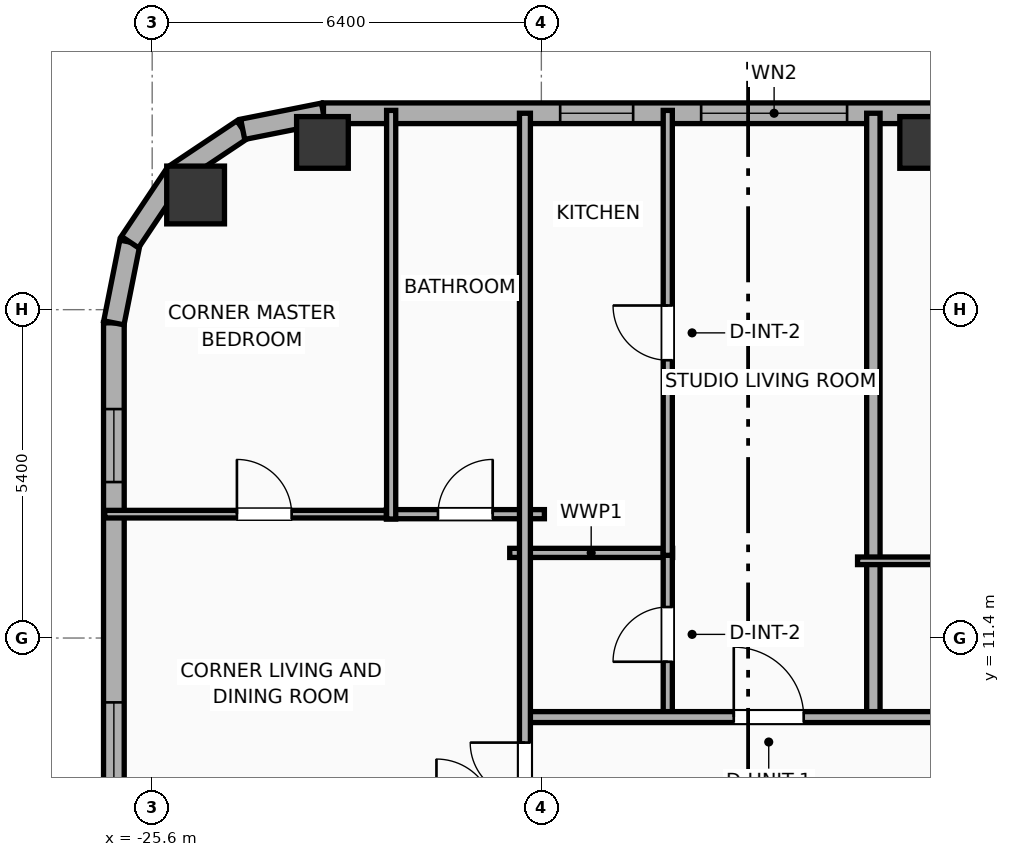
"""IFC4 building model, lengths in metres.
Left out: names, types, materials, properties, quantities, classifications, styles, units other than length and angle.
Written with IfcOpenShell. Run it as: python <this file> out.ifc"""

import sys

from ifc_helpers import new_model, si_unit, direction, frame, frame_2d, origin, origin_2d, place, context, subcontext, project, spatial, rectangle, hollow_rectangle, hollow_circle, extrude, element, fill, save


model = new_model("IFC4")
c1 = context("Model", 3, precision=1e-05, world=origin(), true_north=direction((0.0, 1.0)))
c2 = subcontext(c1, "Body", "Model", "MODEL_VIEW")
j1 = project(units=[si_unit("LENGTHUNIT", "METRE"), si_unit("PLANEANGLEUNIT", "RADIAN")], contexts=[c1])
p1 = place(None, origin())
s1 = spatial("IfcSite", under=j1, at=p1, CompositionType="ELEMENT")
p2 = place(p1, origin())
s2 = spatial("IfcBuilding", under=s1, at=p2, CompositionType="ELEMENT")
p3 = place(p2, frame((0.0, 0.0, 200.2)))
s3 = spatial("IfcBuildingStorey", under=s2, at=p3, CompositionType="ELEMENT", Elevation=200.2)
for number, where, z_axis, x_axis in (
    (1, (-12.88, 19.55, 0.0), (0.0, 0.0, 1.0), (1.0, 0.0, 0.0)),
    (2, (-22.8, 19.55, 0.0), (0.0, 0.0, 1.0), (1.0, 0.0, 0.0)),
):
    element("IfcColumn", number, at=place(p3, frame(where, z_axis=z_axis, x_axis=x_axis)), inside=s3, PredefinedType="COLUMN", context=c2, shape_type="SweptSolid", body=[
        extrude(hollow_rectangle(XDim=0.85, YDim=0.85, WallThickness=0.028, at=origin_2d()), origin(), (0.0, 0.0, 1.0), 3.9),
    ])
p4 = place(p3, frame((-24.886, 18.686, 0.0), z_axis=(0.0, 0.0, 1.0), x_axis=(1.0, 0.0, 0.0)))
e3 = element("IfcColumn", 3, at=p4, inside=s3, PredefinedType="COLUMN", context=c2, shape_type="SweptSolid", body=[
    extrude(hollow_circle(Radius=0.475, WallThickness=0.032, at=origin_2d()), origin(), (0.0, 0.0, 1.0), 3.9),
])
p5 = place(p3, frame((-26.23, -15.383, 0.0), z_axis=(0.0, 0.0, 1.0), x_axis=(0.0, 1.0, 0.0)))
e4 = element("IfcWall", 4, at=p5, inside=s3, PredefinedType="ELEMENTEDWALL", context=c2, shape_type="SweptSolid", body=[
    extrude(rectangle(XDim=31.967, YDim=0.34, at=frame_2d((15.983, 0.0))), origin(), (0.0, 0.0, 1.0), 2.54),
])
p6 = place(p5, frame((6.242, 0.0, 0.75)))
e5 = element("IfcOpeningElement", 5, at=p6, cuts=e4, PredefinedType="OPENING", context=c2, shape_type="SweptSolid", body=[
    extrude(rectangle(XDim=1.8, YDim=1.63, at=frame_2d((0.9, 0.815))), frame((0.0, 0.18, 0.0), z_axis=(0.0, -1.0, 0.0), x_axis=(1.0, 0.0, 0.0)), (0.0, 0.0, 1.0), 0.36),
])
p7 = place(p5, frame((23.925, 0.0, 0.75)))
e6 = element("IfcOpeningElement", 6, at=p7, cuts=e4, PredefinedType="OPENING", context=c2, shape_type="SweptSolid", body=[
    extrude(rectangle(XDim=1.8, YDim=1.63, at=frame_2d((0.9, 0.815))), frame((0.0, 0.18, 0.0), z_axis=(0.0, -1.0, 0.0), x_axis=(1.0, 0.0, 0.0)), (0.0, 0.0, 1.0), 0.36),
])
p8 = place(p5, frame((13.253, 0.0, 0.75)))
e7 = element("IfcOpeningElement", 7, at=p8, cuts=e4, PredefinedType="OPENING", context=c2, shape_type="SweptSolid", body=[
    extrude(rectangle(XDim=1.2, YDim=1.63, at=frame_2d((0.6, 0.815))), frame((0.0, 0.18, 0.0), z_axis=(0.0, -1.0, 0.0), x_axis=(1.0, 0.0, 0.0)), (0.0, 0.0, 1.0), 0.36),
])
p9 = place(p5, frame((29.348, 0.0, 0.75)))
e8 = element("IfcOpeningElement", 8, at=p9, cuts=e4, PredefinedType="OPENING", context=c2, shape_type="SweptSolid", body=[
    extrude(rectangle(XDim=1.2, YDim=1.63, at=frame_2d((0.6, 0.815))), frame((0.0, 0.18, 0.0), z_axis=(0.0, -1.0, 0.0), x_axis=(1.0, 0.0, 0.0)), (0.0, 0.0, 1.0), 0.36),
])
p10 = place(p3, frame((-26.23, 16.583, 0.0), z_axis=(0.0, 0.0, 1.0), x_axis=(0.195075878998, 0.980788153188, 0.0)))
e9 = element("IfcWall", 9, at=p10, inside=s3, PredefinedType="ELEMENTEDWALL", context=c2, shape_type="SweptSolid", body=[
    extrude(rectangle(XDim=1.354, YDim=0.34, at=frame_2d((0.677, 0.0))), origin(), (0.0, 0.0, 1.0), 3.65),
])
p11 = place(p3, frame((-25.966, 17.911, 0.0), z_axis=(0.0, 0.0, 1.0), x_axis=(0.555669034571, 0.831403586725, 0.0)))
e10 = element("IfcWall", 10, at=p11, inside=s3, PredefinedType="ELEMENTEDWALL", context=c2, shape_type="SweptSolid", body=[
    extrude(rectangle(XDim=1.337, YDim=0.34, at=frame_2d((0.668, 0.0))), origin(), (0.0, 0.0, 1.0), 3.65),
])
p12 = place(p3, frame((-25.223, 19.023, 0.0), z_axis=(0.0, 0.0, 1.0), x_axis=(0.831403586725, 0.555669034571, 0.0)))
e11 = element("IfcWall", 11, at=p12, inside=s3, PredefinedType="ELEMENTEDWALL", context=c2, shape_type="SweptSolid", body=[
    extrude(rectangle(XDim=1.337, YDim=0.34, at=frame_2d((0.668, 0.0))), origin(), (0.0, 0.0, 1.0), 2.54),
])
p13 = place(p3, frame((-24.111, 19.766, 0.0), z_axis=(0.0, 0.0, 1.0), x_axis=(0.980788153188, 0.195075878998, 0.0)))
e12 = element("IfcWall", 12, at=p13, inside=s3, PredefinedType="ELEMENTEDWALL", context=c2, shape_type="SweptSolid", body=[
    extrude(rectangle(XDim=1.354, YDim=0.34, at=frame_2d((0.677, 0.0))), origin(), (0.0, 0.0, 1.0), 2.54),
])
p14 = place(p3, frame((-22.783, 20.03, 0.0), z_axis=(0.0, 0.0, 1.0), x_axis=(1.0, 0.0, 0.0)))
e13 = element("IfcWall", 13, at=p14, inside=s3, PredefinedType="ELEMENTEDWALL", context=c2, shape_type="SweptSolid", body=[
    extrude(rectangle(XDim=49.566, YDim=0.34, at=frame_2d((24.783, 0.0))), origin(), (0.0, 0.0, 1.0), 2.54),
])
p15 = place(p14, frame((6.211, 0.0, 0.75)))
e14 = element("IfcOpeningElement", 14, at=p15, cuts=e13, PredefinedType="OPENING", context=c2, shape_type="SweptSolid", body=[
    extrude(rectangle(XDim=2.4, YDim=1.63, at=frame_2d((1.2, 0.815))), frame((0.0, 0.18, 0.0), z_axis=(0.0, -1.0, 0.0), x_axis=(1.0, 0.0, 0.0)), (0.0, 0.0, 1.0), 0.36),
])
p16 = place(p14, frame((23.583, 0.0, 0.75)))
e15 = element("IfcOpeningElement", 15, at=p16, cuts=e13, PredefinedType="OPENING", context=c2, shape_type="SweptSolid", body=[
    extrude(rectangle(XDim=2.4, YDim=1.63, at=frame_2d((1.2, 0.815))), frame((0.0, 0.18, 0.0), z_axis=(0.0, -1.0, 0.0), x_axis=(1.0, 0.0, 0.0)), (0.0, 0.0, 1.0), 0.36),
])
p17 = place(p14, frame((3.893, 0.0, 0.75)))
e16 = element("IfcOpeningElement", 16, at=p17, cuts=e13, PredefinedType="OPENING", context=c2, shape_type="SweptSolid", body=[
    extrude(rectangle(XDim=1.2, YDim=1.63, at=frame_2d((0.6, 0.815))), frame((0.0, 0.18, 0.0), z_axis=(0.0, -1.0, 0.0), x_axis=(1.0, 0.0, 0.0)), (0.0, 0.0, 1.0), 0.36),
])
p18 = place(p14, frame((11.273, 0.0, 0.75)))
e17 = element("IfcOpeningElement", 17, at=p18, cuts=e13, PredefinedType="OPENING", context=c2, shape_type="SweptSolid", body=[
    extrude(rectangle(XDim=1.2, YDim=1.63, at=frame_2d((0.6, 0.815))), frame((0.0, 0.18, 0.0), z_axis=(0.0, -1.0, 0.0), x_axis=(1.0, 0.0, 0.0)), (0.0, 0.0, 1.0), 0.36),
])
p19 = place(p14, frame((31.889, 0.0, 0.75)))
e18 = element("IfcOpeningElement", 18, at=p19, cuts=e13, PredefinedType="OPENING", context=c2, shape_type="SweptSolid", body=[
    extrude(rectangle(XDim=1.2, YDim=1.63, at=frame_2d((0.6, 0.815))), frame((0.0, 0.18, 0.0), z_axis=(0.0, -1.0, 0.0), x_axis=(1.0, 0.0, 0.0)), (0.0, 0.0, 1.0), 0.36),
])
p20 = place(p14, frame((34.719, 0.0, 0.75)))
e19 = element("IfcOpeningElement", 19, at=p20, cuts=e13, PredefinedType="OPENING", context=c2, shape_type="SweptSolid", body=[
    extrude(rectangle(XDim=1.2, YDim=1.63, at=frame_2d((0.6, 0.815))), frame((0.0, 0.18, 0.0), z_axis=(0.0, -1.0, 0.0), x_axis=(1.0, 0.0, 0.0)), (0.0, 0.0, 1.0), 0.36),
])
p21 = place(p14, frame((37.823, 0.0, 0.75)))
e20 = element("IfcOpeningElement", 20, at=p21, cuts=e13, PredefinedType="OPENING", context=c2, shape_type="SweptSolid", body=[
    extrude(rectangle(XDim=1.2, YDim=1.63, at=frame_2d((0.6, 0.815))), frame((0.0, 0.18, 0.0), z_axis=(0.0, -1.0, 0.0), x_axis=(1.0, 0.0, 0.0)), (0.0, 0.0, 1.0), 0.36),
])
p22 = place(p14, frame((16.113, 0.0, 0.75)))
e21 = element("IfcOpeningElement", 21, at=p22, cuts=e13, PredefinedType="OPENING", context=c2, shape_type="SweptSolid", body=[
    extrude(rectangle(XDim=1.2, YDim=1.63, at=frame_2d((0.6, 0.815))), frame((0.0, 0.18, 0.0), z_axis=(0.0, -1.0, 0.0), x_axis=(1.0, 0.0, 0.0)), (0.0, 0.0, 1.0), 0.36),
])
p23 = place(p14, frame((20.513, 0.0, 0.75)))
e22 = element("IfcOpeningElement", 22, at=p23, cuts=e13, PredefinedType="OPENING", context=c2, shape_type="SweptSolid", body=[
    extrude(rectangle(XDim=1.2, YDim=1.63, at=frame_2d((0.6, 0.815))), frame((0.0, 0.18, 0.0), z_axis=(0.0, -1.0, 0.0), x_axis=(1.0, 0.0, 0.0)), (0.0, 0.0, 1.0), 0.36),
])
p24 = place(p14, frame((27.893, 0.0, 0.75)))
e23 = element("IfcOpeningElement", 23, at=p24, cuts=e13, PredefinedType="OPENING", context=c2, shape_type="SweptSolid", body=[
    extrude(rectangle(XDim=1.2, YDim=1.63, at=frame_2d((0.6, 0.815))), frame((0.0, 0.18, 0.0), z_axis=(0.0, -1.0, 0.0), x_axis=(1.0, 0.0, 0.0)), (0.0, 0.0, 1.0), 0.36),
])
p25 = place(p14, frame((45.393, 0.0, 0.75)))
e24 = element("IfcOpeningElement", 24, at=p25, cuts=e13, PredefinedType="OPENING", context=c2, shape_type="SweptSolid", body=[
    extrude(rectangle(XDim=1.2, YDim=1.63, at=frame_2d((0.6, 0.815))), frame((0.0, 0.18, 0.0), z_axis=(0.0, -1.0, 0.0), x_axis=(1.0, 0.0, 0.0)), (0.0, 0.0, 1.0), 0.36),
])
p26 = place(p14, frame((47.28, 0.0, 0.75)))
e25 = element("IfcOpeningElement", 25, at=p26, cuts=e13, PredefinedType="OPENING", context=c2, shape_type="SweptSolid", body=[
    extrude(rectangle(XDim=1.2, YDim=1.63, at=frame_2d((0.6, 0.815))), frame((0.0, 0.18, 0.0), z_axis=(0.0, -1.0, 0.0), x_axis=(1.0, 0.0, 0.0)), (0.0, 0.0, 1.0), 0.36),
])
p27 = place(p3, frame((-19.72, 12.8, 0.0), z_axis=(0.0, 0.0, 1.0), x_axis=(1.0, 0.0, 0.0)))
e26 = element("IfcWall", 26, at=p27, inside=s3, PredefinedType="PLUMBINGWALL", context=c2, shape_type="SweptSolid", body=[
    extrude(rectangle(XDim=2.679, YDim=0.15, at=frame_2d((1.339, 0.0))), origin(), (0.0, 0.0, 1.0), 3.65),
])
p28 = place(p3, frame((-17.121, 10.08, 0.0), z_axis=(0.0, 0.0, 1.0), x_axis=(0.0, 1.0, 0.0)))
e27 = element("IfcWall", 27, at=p28, inside=s3, PredefinedType="PLUMBINGWALL", context=c2, shape_type="SweptSolid", body=[
    extrude(rectangle(XDim=2.76, YDim=0.15, at=frame_2d((1.38, 0.0))), origin(), (0.0, 0.0, 1.0), 3.65),
])
p29 = place(p28, frame((0.93, 0.0, 0.0)))
e28 = element("IfcOpeningElement", 28, at=p29, cuts=e27, PredefinedType="OPENING", context=c2, shape_type="SweptSolid", body=[
    extrude(rectangle(XDim=0.9, YDim=2.05, at=frame_2d((0.45, 1.025))), frame((0.0, 0.085, 0.0), z_axis=(0.0, -1.0, 0.0), x_axis=(1.0, 0.0, 0.0)), (0.0, 0.0, 1.0), 0.17),
])
p30 = place(p3, frame((-17.121, 12.76, 0.0), z_axis=(0.0, 0.0, 1.0), x_axis=(0.0, 1.0, 0.0)))
e29 = element("IfcWall", 29, at=p30, inside=s3, PredefinedType="PLUMBINGWALL", context=c2, shape_type="SweptSolid", body=[
    extrude(rectangle(XDim=7.317, YDim=0.15, at=frame_2d((3.658, 0.0))), origin(), (0.0, 0.0, 1.0), 3.65),
])
p31 = place(p30, frame((3.208, 0.0, 0.0)))
e30 = element("IfcOpeningElement", 30, at=p31, cuts=e29, PredefinedType="OPENING", context=c2, shape_type="SweptSolid", body=[
    extrude(rectangle(XDim=0.9, YDim=2.05, at=frame_2d((0.45, 1.025))), frame((0.0, 0.085, 0.0), z_axis=(0.0, -1.0, 0.0), x_axis=(1.0, 0.0, 0.0)), (0.0, 0.0, 1.0), 0.17),
])
p32 = place(p3, frame((-13.74, 10.02, 0.0), z_axis=(0.0, 0.0, 1.0), x_axis=(0.0, 1.0, 0.0)))
e31 = element("IfcWall", 31, at=p32, inside=s3, PredefinedType="PARTITIONING", context=c2, shape_type="SweptSolid", body=[
    extrude(rectangle(XDim=10.01, YDim=0.22, at=frame_2d((5.005, 0.0))), origin(), (0.0, 0.0, 1.0), 3.65),
])
p33 = place(p3, frame((-14.0, 12.67, 0.0), z_axis=(0.0, 0.0, 1.0), x_axis=(1.0, 0.0, 0.0)))
e32 = element("IfcWall", 32, at=p33, inside=s3, PredefinedType="PARTITIONING", context=c2, shape_type="SweptSolid", body=[
    extrude(rectangle(XDim=2.63, YDim=0.125, at=frame_2d((1.315, 0.0))), origin(), (0.0, 0.0, 1.0), 3.65),
])
p34 = place(p3, frame((-19.5, 10.1, 0.0), z_axis=(0.0, 0.0, 1.0), x_axis=(1.0, 0.0, 0.0)))
e33 = element("IfcWall", 33, at=p34, inside=s3, PredefinedType="PARTITIONING", context=c2, shape_type="SweptSolid", body=[
    extrude(rectangle(XDim=11.42, YDim=0.18, at=frame_2d((5.71, 0.0))), origin(), (0.0, 0.0, 1.0), 3.65),
])
p35 = place(p34, frame((3.464, 0.0, 0.0)))
e34 = element("IfcOpeningElement", 34, at=p35, cuts=e33, PredefinedType="OPENING", context=c2, shape_type="SweptSolid", body=[
    extrude(rectangle(XDim=1.15, YDim=2.05, at=frame_2d((0.575, 1.025))), frame((0.0, 0.1, 0.0), z_axis=(0.0, -1.0, 0.0), x_axis=(1.0, 0.0, 0.0)), (0.0, 0.0, 1.0), 0.2),
])
p36 = place(p34, frame((8.323, 0.0, 0.0)))
e35 = element("IfcOpeningElement", 35, at=p36, cuts=e33, PredefinedType="OPENING", context=c2, shape_type="SweptSolid", body=[
    extrude(rectangle(XDim=0.9, YDim=2.05, at=frame_2d((0.45, 1.025))), frame((0.0, 0.1, 0.0), z_axis=(0.0, -1.0, 0.0), x_axis=(1.0, 0.0, 0.0)), (0.0, 0.0, 1.0), 0.2),
])
p37 = place(p3, frame((-26.38, 13.437, 0.0), z_axis=(0.0, 0.0, 1.0), x_axis=(1.0, 0.0, 0.0)))
e36 = element("IfcWall", 36, at=p37, inside=s3, PredefinedType="PARTITIONING", context=c2, shape_type="SweptSolid", body=[
    extrude(rectangle(XDim=4.77, YDim=0.125, at=frame_2d((2.385, 0.0))), origin(), (0.0, 0.0, 1.0), 3.65),
])
p38 = place(p37, frame((2.174, 0.0, 0.0)))
e37 = element("IfcOpeningElement", 37, at=p38, cuts=e36, PredefinedType="OPENING", context=c2, shape_type="SweptSolid", body=[
    extrude(rectangle(XDim=0.9, YDim=2.05, at=frame_2d((0.45, 1.025))), frame((0.0, 0.073, 0.0), z_axis=(0.0, -1.0, 0.0), x_axis=(1.0, 0.0, 0.0)), (0.0, 0.0, 1.0), 0.145),
])
p39 = place(p3, frame((-21.75, 13.437, 0.0), z_axis=(0.0, 0.0, 1.0), x_axis=(1.0, 0.0, 0.0)))
e38 = element("IfcWall", 38, at=p39, inside=s3, PredefinedType="PLUMBINGWALL", context=c2, shape_type="SweptSolid", body=[
    extrude(rectangle(XDim=2.6, YDim=0.15, at=frame_2d((1.3, 0.0))), origin(), (0.0, 0.0, 1.0), 3.65),
])
p40 = place(p39, frame((0.85, 0.0, 0.0)))
e39 = element("IfcOpeningElement", 39, at=p40, cuts=e38, PredefinedType="OPENING", context=c2, shape_type="SweptSolid", body=[
    extrude(rectangle(XDim=0.9, YDim=2.05, at=frame_2d((0.45, 1.025))), frame((0.0, 0.085, 0.0), z_axis=(0.0, -1.0, 0.0), x_axis=(1.0, 0.0, 0.0)), (0.0, 0.0, 1.0), 0.17),
])
p41 = place(p3, frame((-21.67, 13.357, 0.0), z_axis=(0.0, 0.0, 1.0), x_axis=(0.0, 1.0, 0.0)))
e40 = element("IfcWall", 40, at=p41, inside=s3, PredefinedType="PLUMBINGWALL", context=c2, shape_type="SweptSolid", body=[
    extrude(rectangle(XDim=6.72, YDim=0.15, at=frame_2d((3.36, 0.0))), origin(), (0.0, 0.0, 1.0), 2.54),
])
p42 = place(p3, frame((-19.47, 1.8, 0.0), z_axis=(0.0, 0.0, 1.0), x_axis=(0.0, 1.0, 0.0)))
e41 = element("IfcWall", 41, at=p42, inside=s3, PredefinedType="PARTITIONING", context=c2, shape_type="SweptSolid", body=[
    extrude(rectangle(XDim=18.23, YDim=0.18, at=frame_2d((9.115, 0.0))), origin(), (0.0, 0.0, 1.0), 2.54),
])
p43 = place(p42, frame((6.98, 0.0, 0.0)))
e42 = element("IfcOpeningElement", 42, at=p43, cuts=e41, PredefinedType="OPENING", context=c2, shape_type="SweptSolid", body=[
    extrude(rectangle(XDim=0.9, YDim=2.05, at=frame_2d((0.45, 1.025))), frame((0.0, 0.1, 0.0), z_axis=(0.0, -1.0, 0.0), x_axis=(1.0, 0.0, 0.0)), (0.0, 0.0, 1.0), 0.2),
])
p44 = place(p7, origin())
e43 = element("IfcWindow", 43, at=p44, inside=s3, PartitioningType="SINGLE_PANEL", PredefinedType="WINDOW", context=c2, shape_type="SweptSolid", body=[
    extrude(rectangle(XDim=1.8, YDim=1.63, at=frame_2d((0.9, 0.815))), frame((0.0, 0.03, 0.0), z_axis=(0.0, -1.0, 0.0), x_axis=(1.0, 0.0, 0.0)), (0.0, 0.0, 1.0), 0.06),
])
fill(e6, e43)
p45 = place(p15, origin())
e44 = element("IfcWindow", 44, at=p45, inside=s3, PartitioningType="SINGLE_PANEL", PredefinedType="WINDOW", context=c2, shape_type="SweptSolid", body=[
    extrude(rectangle(XDim=2.4, YDim=1.63, at=frame_2d((1.2, 0.815))), frame((0.0, 0.03, 0.0), z_axis=(0.0, -1.0, 0.0), x_axis=(1.0, 0.0, 0.0)), (0.0, 0.0, 1.0), 0.06),
])
fill(e14, e44)
p46 = place(p17, origin())
e45 = element("IfcWindow", 45, at=p46, inside=s3, PartitioningType="SINGLE_PANEL", PredefinedType="WINDOW", context=c2, shape_type="SweptSolid", body=[
    extrude(rectangle(XDim=1.2, YDim=1.63, at=frame_2d((0.6, 0.815))), frame((0.0, 0.03, 0.0), z_axis=(0.0, -1.0, 0.0), x_axis=(1.0, 0.0, 0.0)), (0.0, 0.0, 1.0), 0.06),
])
fill(e16, e45)
p47 = place(p9, origin())
e46 = element("IfcWindow", 46, at=p47, inside=s3, PartitioningType="SINGLE_PANEL", PredefinedType="WINDOW", context=c2, shape_type="SweptSolid", body=[
    extrude(rectangle(XDim=1.2, YDim=1.63, at=frame_2d((0.6, 0.815))), frame((0.0, 0.03, 0.0), z_axis=(0.0, -1.0, 0.0), x_axis=(1.0, 0.0, 0.0)), (0.0, 0.0, 1.0), 0.06),
])
fill(e8, e46)
p48 = place(p29, origin())
e47 = element("IfcDoor", 47, at=p48, inside=s3, OperationType="SINGLE_SWING_LEFT", PredefinedType="DOOR", context=c2, shape_type="SweptSolid", body=[
    extrude(rectangle(XDim=0.9, YDim=2.05, at=frame_2d((0.45, 1.025))), frame((0.0, 0.025, 0.0), z_axis=(0.0, -1.0, 0.0), x_axis=(1.0, 0.0, 0.0)), (0.0, 0.0, 1.0), 0.05),
])
fill(e28, e47)
p49 = place(p31, origin())
e48 = element("IfcDoor", 48, at=p49, inside=s3, OperationType="SINGLE_SWING_RIGHT", PredefinedType="DOOR", context=c2, shape_type="SweptSolid", body=[
    extrude(rectangle(XDim=0.9, YDim=2.05, at=frame_2d((0.45, 1.025))), frame((0.0, 0.025, 0.0), z_axis=(0.0, -1.0, 0.0), x_axis=(1.0, 0.0, 0.0)), (0.0, 0.0, 1.0), 0.05),
])
fill(e30, e48)
p50 = place(p35, origin())
e49 = element("IfcDoor", 49, at=p50, inside=s3, OperationType="SINGLE_SWING_LEFT", PredefinedType="DOOR", context=c2, shape_type="SweptSolid", body=[
    extrude(rectangle(XDim=1.15, YDim=2.05, at=frame_2d((0.575, 1.025))), frame((0.0, 0.025, 0.0), z_axis=(0.0, -1.0, 0.0), x_axis=(1.0, 0.0, 0.0)), (0.0, 0.0, 1.0), 0.05),
])
fill(e34, e49)
p51 = place(p38, origin())
e50 = element("IfcDoor", 50, at=p51, inside=s3, OperationType="SINGLE_SWING_LEFT", PredefinedType="DOOR", context=c2, shape_type="SweptSolid", body=[
    extrude(rectangle(XDim=0.9, YDim=2.05, at=frame_2d((0.45, 1.025))), frame((0.0, 0.025, 0.0), z_axis=(0.0, -1.0, 0.0), x_axis=(1.0, 0.0, 0.0)), (0.0, 0.0, 1.0), 0.05),
])
fill(e37, e50)
p52 = place(p40, origin())
e51 = element("IfcDoor", 51, at=p52, inside=s3, OperationType="SINGLE_SWING_RIGHT", PredefinedType="DOOR", context=c2, shape_type="SweptSolid", body=[
    extrude(rectangle(XDim=0.9, YDim=2.05, at=frame_2d((0.45, 1.025))), frame((0.0, 0.025, 0.0), z_axis=(0.0, -1.0, 0.0), x_axis=(1.0, 0.0, 0.0)), (0.0, 0.0, 1.0), 0.05),
])
fill(e39, e51)
p53 = place(p43, origin())
e52 = element("IfcDoor", 52, at=p53, inside=s3, OperationType="SINGLE_SWING_RIGHT", PredefinedType="DOOR", context=c2, shape_type="SweptSolid", body=[
    extrude(rectangle(XDim=0.9, YDim=2.05, at=frame_2d((0.45, 1.025))), frame((0.0, 0.025, 0.0), z_axis=(0.0, -1.0, 0.0), x_axis=(1.0, 0.0, 0.0)), (0.0, 0.0, 1.0), 0.05),
])
fill(e42, e52)
save(model, sys.argv[1])
